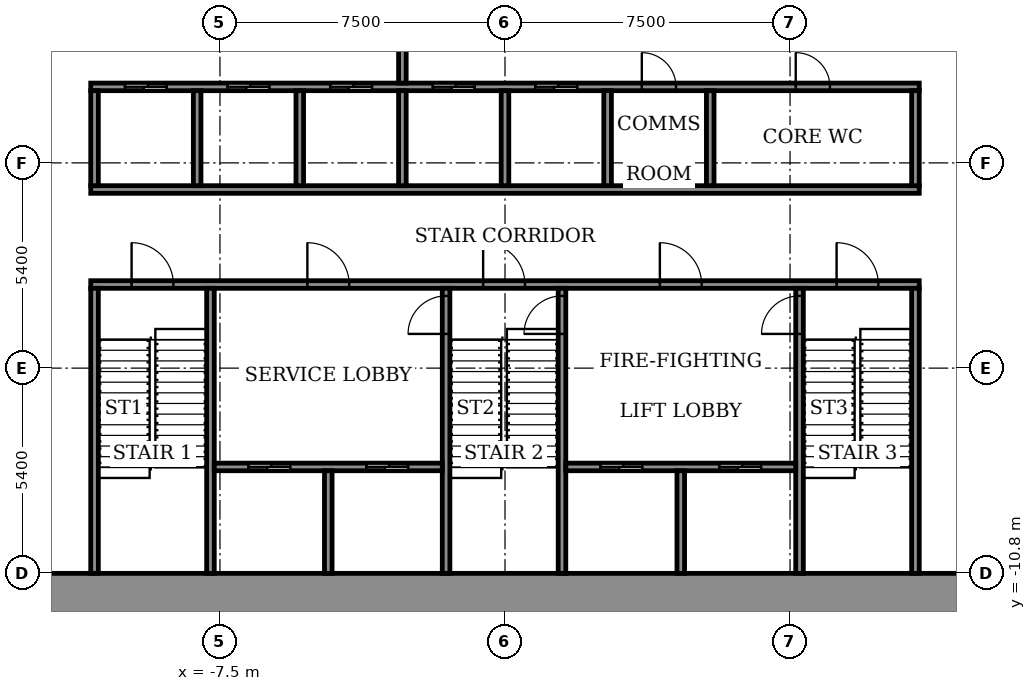
"""IFC4 building model, lengths in metres.
Left out: names, types, materials, properties, quantities, classifications, styles, units other than length and angle.
Written with IfcOpenShell. Run it as: python <this file> out.ifc"""

import sys

from ifc_helpers import new_model, si_unit, direction, frame, frame_2d, origin, place, context, subcontext, project, spatial, rectangle, extrude, element, fill, save


model = new_model("IFC4")
c1 = context("Model", 3, precision=1e-05, world=origin(), true_north=direction((0.0, 1.0)))
c2 = subcontext(c1, "Body", "Model", "MODEL_VIEW")
j1 = project(units=[si_unit("LENGTHUNIT", "METRE"), si_unit("PLANEANGLEUNIT", "RADIAN")], contexts=[c1])
p1 = place(None, origin())
s1 = spatial("IfcSite", under=j1, at=p1, CompositionType="ELEMENT")
p2 = place(p1, origin())
s2 = spatial("IfcBuilding", under=s1, at=p2, CompositionType="ELEMENT")
p3 = place(p2, frame((0.0, 0.0, 52.1)))
s3 = spatial("IfcBuildingStorey", under=s2, at=p3, CompositionType="ELEMENT", Elevation=52.1)
p4 = place(p3, frame((-14.9, -11.35, 0.0), z_axis=(0.0, 0.0, 1.0), x_axis=(1.0, 0.0, 0.0)))
e1 = element("IfcWall", 1, at=p4, inside=s3, PredefinedType="SHEAR", context=c2, shape_type="SweptSolid", body=[
    extrude(rectangle(XDim=29.8, YDim=1.1, at=frame_2d((14.9, 0.0))), origin(), (0.0, 0.0, 1.0), 4.6),
])
p5 = place(p3, frame((-10.9, -3.2, 0.0), z_axis=(0.0, 0.0, 1.0), x_axis=(1.0, 0.0, 0.0)))
e2 = element("IfcWall", 2, at=p5, inside=s3, PredefinedType="SHEAR", context=c2, shape_type="SweptSolid", body=[
    extrude(rectangle(XDim=21.8, YDim=0.2, at=frame_2d((10.9, 0.0))), origin(), (0.0, 0.0, 1.0), 4.05),
])
p6 = place(p5, frame((1.075, 0.0, 0.0)))
e3 = element("IfcOpeningElement", 3, at=p6, cuts=e2, PredefinedType="OPENING", context=c2, shape_type="SweptSolid", body=[
    extrude(rectangle(XDim=1.1, YDim=2.1, at=frame_2d((0.55, 1.05))), frame((0.0, 0.11, 0.0), z_axis=(0.0, -1.0, 0.0), x_axis=(1.0, 0.0, 0.0)), (0.0, 0.0, 1.0), 0.22),
])
p7 = place(p5, frame((10.325, 0.0, 0.0)))
e4 = element("IfcOpeningElement", 4, at=p7, cuts=e2, PredefinedType="OPENING", context=c2, shape_type="SweptSolid", body=[
    extrude(rectangle(XDim=1.1, YDim=2.1, at=frame_2d((0.55, 1.05))), frame((0.0, 0.11, 0.0), z_axis=(0.0, -1.0, 0.0), x_axis=(1.0, 0.0, 0.0)), (0.0, 0.0, 1.0), 0.22),
])
p8 = place(p5, frame((19.625, 0.0, 0.0)))
e5 = element("IfcOpeningElement", 5, at=p8, cuts=e2, PredefinedType="OPENING", context=c2, shape_type="SweptSolid", body=[
    extrude(rectangle(XDim=1.1, YDim=2.1, at=frame_2d((0.55, 1.05))), frame((0.0, 0.11, 0.0), z_axis=(0.0, -1.0, 0.0), x_axis=(1.0, 0.0, 0.0)), (0.0, 0.0, 1.0), 0.22),
])
p9 = place(p5, frame((5.7, 0.0, 0.0)))
e6 = element("IfcOpeningElement", 6, at=p9, cuts=e2, PredefinedType="OPENING", context=c2, shape_type="SweptSolid", body=[
    extrude(rectangle(XDim=1.1, YDim=2.1, at=frame_2d((0.55, 1.05))), frame((0.0, 0.11, 0.0), z_axis=(0.0, -1.0, 0.0), x_axis=(1.0, 0.0, 0.0)), (0.0, 0.0, 1.0), 0.22),
])
p10 = place(p5, frame((14.975, 0.0, 0.0)))
e7 = element("IfcOpeningElement", 7, at=p10, cuts=e2, PredefinedType="OPENING", context=c2, shape_type="SweptSolid", body=[
    extrude(rectangle(XDim=1.1, YDim=2.1, at=frame_2d((0.55, 1.05))), frame((0.0, 0.11, 0.0), z_axis=(0.0, -1.0, 0.0), x_axis=(1.0, 0.0, 0.0)), (0.0, 0.0, 1.0), 0.22),
])
p11 = place(p3, frame((-10.9, -0.7, 0.0), z_axis=(0.0, 0.0, 1.0), x_axis=(1.0, 0.0, 0.0)))
e8 = element("IfcWall", 8, at=p11, inside=s3, PredefinedType="SHEAR", context=c2, shape_type="SweptSolid", body=[
    extrude(rectangle(XDim=21.8, YDim=0.2, at=frame_2d((10.9, 0.0))), origin(), (0.0, 0.0, 1.0), 4.05),
])
p12 = place(p3, frame((-10.9, 2.0, 0.0), z_axis=(0.0, 0.0, 1.0), x_axis=(1.0, 0.0, 0.0)))
e9 = element("IfcWall", 9, at=p12, inside=s3, PredefinedType="SHEAR", context=c2, shape_type="SweptSolid", body=[
    extrude(rectangle(XDim=21.8, YDim=0.2, at=frame_2d((10.9, 0.0))), origin(), (0.0, 0.0, 1.0), 4.05),
])
p13 = place(p12, frame((0.9, 0.0, 0.0)))
e10 = element("IfcOpeningElement", 10, at=p13, cuts=e9, PredefinedType="OPENING", context=c2, shape_type="SweptSolid", body=[
    extrude(rectangle(XDim=1.1, YDim=2.1, at=frame_2d((0.55, 1.05))), frame((0.0, 0.11, 0.0), z_axis=(0.0, -1.0, 0.0), x_axis=(1.0, 0.0, 0.0)), (0.0, 0.0, 1.0), 0.22),
])
p14 = place(p12, frame((3.6, 0.0, 0.0)))
e11 = element("IfcOpeningElement", 11, at=p14, cuts=e9, PredefinedType="OPENING", context=c2, shape_type="SweptSolid", body=[
    extrude(rectangle(XDim=1.1, YDim=2.1, at=frame_2d((0.55, 1.05))), frame((0.0, 0.11, 0.0), z_axis=(0.0, -1.0, 0.0), x_axis=(1.0, 0.0, 0.0)), (0.0, 0.0, 1.0), 0.22),
])
p15 = place(p12, frame((6.3, 0.0, 0.0)))
e12 = element("IfcOpeningElement", 12, at=p15, cuts=e9, PredefinedType="OPENING", context=c2, shape_type="SweptSolid", body=[
    extrude(rectangle(XDim=1.1, YDim=2.1, at=frame_2d((0.55, 1.05))), frame((0.0, 0.11, 0.0), z_axis=(0.0, -1.0, 0.0), x_axis=(1.0, 0.0, 0.0)), (0.0, 0.0, 1.0), 0.22),
])
p16 = place(p12, frame((9.0, 0.0, 0.0)))
e13 = element("IfcOpeningElement", 13, at=p16, cuts=e9, PredefinedType="OPENING", context=c2, shape_type="SweptSolid", body=[
    extrude(rectangle(XDim=1.1, YDim=2.1, at=frame_2d((0.55, 1.05))), frame((0.0, 0.11, 0.0), z_axis=(0.0, -1.0, 0.0), x_axis=(1.0, 0.0, 0.0)), (0.0, 0.0, 1.0), 0.22),
])
p17 = place(p12, frame((11.7, 0.0, 0.0)))
e14 = element("IfcOpeningElement", 14, at=p17, cuts=e9, PredefinedType="OPENING", context=c2, shape_type="SweptSolid", body=[
    extrude(rectangle(XDim=1.1, YDim=2.1, at=frame_2d((0.55, 1.05))), frame((0.0, 0.11, 0.0), z_axis=(0.0, -1.0, 0.0), x_axis=(1.0, 0.0, 0.0)), (0.0, 0.0, 1.0), 0.22),
])
p18 = place(p12, frame((14.5, 0.0, 0.0)))
e15 = element("IfcOpeningElement", 15, at=p18, cuts=e9, PredefinedType="OPENING", context=c2, shape_type="SweptSolid", body=[
    extrude(rectangle(XDim=0.9, YDim=2.1, at=frame_2d((0.45, 1.05))), frame((0.0, 0.11, 0.0), z_axis=(0.0, -1.0, 0.0), x_axis=(1.0, 0.0, 0.0)), (0.0, 0.0, 1.0), 0.22),
])
p19 = place(p12, frame((18.55, 0.0, 0.0)))
e16 = element("IfcOpeningElement", 16, at=p19, cuts=e9, PredefinedType="OPENING", context=c2, shape_type="SweptSolid", body=[
    extrude(rectangle(XDim=0.9, YDim=2.1, at=frame_2d((0.45, 1.05))), frame((0.0, 0.11, 0.0), z_axis=(0.0, -1.0, 0.0), x_axis=(1.0, 0.0, 0.0)), (0.0, 0.0, 1.0), 0.22),
])
for number, where, z_axis, x_axis in (
    (17, (-10.8, -10.8, 0.0), (0.0, 0.0, 1.0), (0.0, 1.0, 0.0)),
    (18, (-7.75, -10.8, 0.0), (0.0, 0.0, 1.0), (0.0, 1.0, 0.0)),
):
    element("IfcWall", number, at=place(p3, frame(where, z_axis=z_axis, x_axis=x_axis)), inside=s3, PredefinedType="SHEAR", context=c2, shape_type="SweptSolid", body=[
        extrude(rectangle(XDim=7.5, YDim=0.2, at=frame_2d((3.75, 0.0))), origin(), (0.0, 0.0, 1.0), 4.05),
    ])
p20 = place(p3, frame((-1.55, -10.8, 0.0), z_axis=(0.0, 0.0, 1.0), x_axis=(0.0, 1.0, 0.0)))
e19 = element("IfcWall", 19, at=p20, inside=s3, PredefinedType="SHEAR", context=c2, shape_type="SweptSolid", body=[
    extrude(rectangle(XDim=7.5, YDim=0.2, at=frame_2d((3.75, 0.0))), origin(), (0.0, 0.0, 1.0), 4.05),
])
p21 = place(p20, frame((6.3, 0.0, 0.0)))
e20 = element("IfcOpeningElement", 20, at=p21, cuts=e19, PredefinedType="OPENING", context=c2, shape_type="SweptSolid", body=[
    extrude(rectangle(XDim=1.0, YDim=2.1, at=frame_2d((0.5, 1.05))), frame((0.0, 0.11, 0.0), z_axis=(0.0, -1.0, 0.0), x_axis=(1.0, 0.0, 0.0)), (0.0, 0.0, 1.0), 0.22),
])
p22 = place(p3, frame((1.5, -10.8, 0.0), z_axis=(0.0, 0.0, 1.0), x_axis=(0.0, 1.0, 0.0)))
e21 = element("IfcWall", 21, at=p22, inside=s3, PredefinedType="SHEAR", context=c2, shape_type="SweptSolid", body=[
    extrude(rectangle(XDim=7.5, YDim=0.2, at=frame_2d((3.75, 0.0))), origin(), (0.0, 0.0, 1.0), 4.05),
])
p23 = place(p22, frame((6.3, 0.0, 0.0)))
e22 = element("IfcOpeningElement", 22, at=p23, cuts=e21, PredefinedType="OPENING", context=c2, shape_type="SweptSolid", body=[
    extrude(rectangle(XDim=1.0, YDim=2.1, at=frame_2d((0.5, 1.05))), frame((0.0, 0.11, 0.0), z_axis=(0.0, -1.0, 0.0), x_axis=(1.0, 0.0, 0.0)), (0.0, 0.0, 1.0), 0.22),
])
p24 = place(p3, frame((7.75, -10.8, 0.0), z_axis=(0.0, 0.0, 1.0), x_axis=(0.0, 1.0, 0.0)))
e23 = element("IfcWall", 23, at=p24, inside=s3, PredefinedType="SHEAR", context=c2, shape_type="SweptSolid", body=[
    extrude(rectangle(XDim=7.5, YDim=0.2, at=frame_2d((3.75, 0.0))), origin(), (0.0, 0.0, 1.0), 4.05),
])
p25 = place(p24, frame((6.3, 0.0, 0.0)))
e24 = element("IfcOpeningElement", 24, at=p25, cuts=e23, PredefinedType="OPENING", context=c2, shape_type="SweptSolid", body=[
    extrude(rectangle(XDim=1.0, YDim=2.1, at=frame_2d((0.5, 1.05))), frame((0.0, 0.11, 0.0), z_axis=(0.0, -1.0, 0.0), x_axis=(1.0, 0.0, 0.0)), (0.0, 0.0, 1.0), 0.22),
])
p26 = place(p3, frame((10.8, -10.8, 0.0), z_axis=(0.0, 0.0, 1.0), x_axis=(0.0, 1.0, 0.0)))
e25 = element("IfcWall", 25, at=p26, inside=s3, PredefinedType="SHEAR", context=c2, shape_type="SweptSolid", body=[
    extrude(rectangle(XDim=7.5, YDim=0.2, at=frame_2d((3.75, 0.0))), origin(), (0.0, 0.0, 1.0), 4.05),
])
p27 = place(p3, frame((-7.65, -8.0, 0.0), z_axis=(0.0, 0.0, 1.0), x_axis=(1.0, 0.0, 0.0)))
e26 = element("IfcWall", 26, at=p27, inside=s3, PredefinedType="SHEAR", context=c2, shape_type="SweptSolid", body=[
    extrude(rectangle(XDim=6.0, YDim=0.2, at=frame_2d((3.0, 0.0))), origin(), (0.0, 0.0, 1.0), 4.05),
])
p28 = place(p27, frame((0.9, 0.0, 0.0)))
e27 = element("IfcOpeningElement", 27, at=p28, cuts=e26, PredefinedType="OPENING", context=c2, shape_type="SweptSolid", body=[
    extrude(rectangle(XDim=1.1, YDim=2.1, at=frame_2d((0.55, 1.05))), frame((0.0, 0.11, 0.0), z_axis=(0.0, -1.0, 0.0), x_axis=(1.0, 0.0, 0.0)), (0.0, 0.0, 1.0), 0.22),
])
p29 = place(p27, frame((4.0, 0.0, 0.0)))
e28 = element("IfcOpeningElement", 28, at=p29, cuts=e26, PredefinedType="OPENING", context=c2, shape_type="SweptSolid", body=[
    extrude(rectangle(XDim=1.1, YDim=2.1, at=frame_2d((0.55, 1.05))), frame((0.0, 0.11, 0.0), z_axis=(0.0, -1.0, 0.0), x_axis=(1.0, 0.0, 0.0)), (0.0, 0.0, 1.0), 0.22),
])
p30 = place(p3, frame((-4.65, -10.8, 0.0), z_axis=(0.0, 0.0, 1.0), x_axis=(0.0, 1.0, 0.0)))
e29 = element("IfcWall", 29, at=p30, inside=s3, PredefinedType="SHEAR", context=c2, shape_type="SweptSolid", body=[
    extrude(rectangle(XDim=2.7, YDim=0.2, at=frame_2d((1.35, 0.0))), origin(), (0.0, 0.0, 1.0), 4.05),
])
p31 = place(p3, frame((1.6, -8.0, 0.0), z_axis=(0.0, 0.0, 1.0), x_axis=(1.0, 0.0, 0.0)))
e30 = element("IfcWall", 30, at=p31, inside=s3, PredefinedType="SHEAR", context=c2, shape_type="SweptSolid", body=[
    extrude(rectangle(XDim=6.05, YDim=0.2, at=frame_2d((3.025, 0.0))), origin(), (0.0, 0.0, 1.0), 4.05),
])
p32 = place(p31, frame((0.913, 0.0, 0.0)))
e31 = element("IfcOpeningElement", 31, at=p32, cuts=e30, PredefinedType="OPENING", context=c2, shape_type="SweptSolid", body=[
    extrude(rectangle(XDim=1.1, YDim=2.1, at=frame_2d((0.55, 1.05))), frame((0.0, 0.11, 0.0), z_axis=(0.0, -1.0, 0.0), x_axis=(1.0, 0.0, 0.0)), (0.0, 0.0, 1.0), 0.22),
])
p33 = place(p31, frame((4.038, 0.0, 0.0)))
e32 = element("IfcOpeningElement", 32, at=p33, cuts=e30, PredefinedType="OPENING", context=c2, shape_type="SweptSolid", body=[
    extrude(rectangle(XDim=1.1, YDim=2.1, at=frame_2d((0.55, 1.05))), frame((0.0, 0.11, 0.0), z_axis=(0.0, -1.0, 0.0), x_axis=(1.0, 0.0, 0.0)), (0.0, 0.0, 1.0), 0.22),
])
p34 = place(p3, frame((4.625, -10.8, 0.0), z_axis=(0.0, 0.0, 1.0), x_axis=(0.0, 1.0, 0.0)))
e33 = element("IfcWall", 33, at=p34, inside=s3, PredefinedType="SHEAR", context=c2, shape_type="SweptSolid", body=[
    extrude(rectangle(XDim=2.7, YDim=0.2, at=frame_2d((1.35, 0.0))), origin(), (0.0, 0.0, 1.0), 4.05),
])
for number, where, z_axis, x_axis in (
    (34, (-10.8, -0.6, 0.0), (0.0, 0.0, 1.0), (0.0, 1.0, 0.0)),
    (35, (-8.1, -0.6, 0.0), (0.0, 0.0, 1.0), (0.0, 1.0, 0.0)),
    (36, (-5.4, -0.6, 0.0), (0.0, 0.0, 1.0), (0.0, 1.0, 0.0)),
    (37, (-2.7, -0.6, 0.0), (0.0, 0.0, 1.0), (0.0, 1.0, 0.0)),
    (38, (0.0, -0.6, 0.0), (0.0, 0.0, 1.0), (0.0, 1.0, 0.0)),
    (39, (2.7, -0.6, 0.0), (0.0, 0.0, 1.0), (0.0, 1.0, 0.0)),
):
    element("IfcWall", number, at=place(p3, frame(where, z_axis=z_axis, x_axis=x_axis)), inside=s3, PredefinedType="SHEAR", context=c2, shape_type="SweptSolid", body=[
        extrude(rectangle(XDim=2.5, YDim=0.2, at=frame_2d((1.25, 0.0))), origin(), (0.0, 0.0, 1.0), 4.05),
    ])
for number, where, z_axis, x_axis in (
    (40, (5.4, -0.6, 0.0), (0.0, 0.0, 1.0), (0.0, 1.0, 0.0)),
    (41, (10.8, -0.6, 0.0), (0.0, 0.0, 1.0), (0.0, 1.0, 0.0)),
):
    element("IfcWall", number, at=place(p3, frame(where, z_axis=z_axis, x_axis=x_axis)), inside=s3, PredefinedType="STANDARD", context=c2, shape_type="SweptSolid", body=[
        extrude(rectangle(XDim=2.5, YDim=0.2, at=frame_2d((1.25, 0.0))), origin(), (0.0, 0.0, 1.0), 4.05),
    ])
p35 = place(p3, frame((-2.7, 2.1, 0.0), z_axis=(0.0, 0.0, 1.0), x_axis=(0.0, 1.0, 0.0)))
e42 = element("IfcWall", 42, at=p35, inside=s3, PredefinedType="STANDARD", context=c2, shape_type="SweptSolid", body=[
    extrude(rectangle(XDim=5.9, YDim=0.2, at=frame_2d((2.95, 0.0))), origin(), (0.0, 0.0, 1.0), 4.05),
])
p36 = place(p35, frame((2.35, 0.0, 0.0)))
e43 = element("IfcOpeningElement", 43, at=p36, cuts=e42, PredefinedType="OPENING", context=c2, shape_type="SweptSolid", body=[
    extrude(rectangle(XDim=1.2, YDim=2.1, at=frame_2d((0.6, 1.05))), frame((0.0, 0.11, 0.0), z_axis=(0.0, -1.0, 0.0), x_axis=(1.0, 0.0, 0.0)), (0.0, 0.0, 1.0), 0.22),
])
p37 = place(p13, origin())
e44 = element("IfcDoor", 44, at=p37, inside=s3, OperationType="SLIDING_TO_LEFT", PredefinedType="DOOR", context=c2, shape_type="SweptSolid", body=[
    extrude(rectangle(XDim=1.1, YDim=2.1, at=frame_2d((0.55, 1.05))), frame((0.0, 0.025, 0.0), z_axis=(0.0, -1.0, 0.0), x_axis=(1.0, 0.0, 0.0)), (0.0, 0.0, 1.0), 0.05),
])
fill(e10, e44)
p38 = place(p14, origin())
e45 = element("IfcDoor", 45, at=p38, inside=s3, OperationType="SLIDING_TO_LEFT", PredefinedType="DOOR", context=c2, shape_type="SweptSolid", body=[
    extrude(rectangle(XDim=1.1, YDim=2.1, at=frame_2d((0.55, 1.05))), frame((0.0, 0.025, 0.0), z_axis=(0.0, -1.0, 0.0), x_axis=(1.0, 0.0, 0.0)), (0.0, 0.0, 1.0), 0.05),
])
fill(e11, e45)
p39 = place(p15, origin())
e46 = element("IfcDoor", 46, at=p39, inside=s3, OperationType="SLIDING_TO_LEFT", PredefinedType="DOOR", context=c2, shape_type="SweptSolid", body=[
    extrude(rectangle(XDim=1.1, YDim=2.1, at=frame_2d((0.55, 1.05))), frame((0.0, 0.025, 0.0), z_axis=(0.0, -1.0, 0.0), x_axis=(1.0, 0.0, 0.0)), (0.0, 0.0, 1.0), 0.05),
])
fill(e12, e46)
p40 = place(p16, origin())
e47 = element("IfcDoor", 47, at=p40, inside=s3, OperationType="SLIDING_TO_LEFT", PredefinedType="DOOR", context=c2, shape_type="SweptSolid", body=[
    extrude(rectangle(XDim=1.1, YDim=2.1, at=frame_2d((0.55, 1.05))), frame((0.0, 0.025, 0.0), z_axis=(0.0, -1.0, 0.0), x_axis=(1.0, 0.0, 0.0)), (0.0, 0.0, 1.0), 0.05),
])
fill(e13, e47)
p41 = place(p17, origin())
e48 = element("IfcDoor", 48, at=p41, inside=s3, OperationType="SLIDING_TO_LEFT", PredefinedType="DOOR", context=c2, shape_type="SweptSolid", body=[
    extrude(rectangle(XDim=1.1, YDim=2.1, at=frame_2d((0.55, 1.05))), frame((0.0, 0.025, 0.0), z_axis=(0.0, -1.0, 0.0), x_axis=(1.0, 0.0, 0.0)), (0.0, 0.0, 1.0), 0.05),
])
fill(e14, e48)
p42 = place(p18, origin())
e49 = element("IfcDoor", 49, at=p42, inside=s3, OperationType="SINGLE_SWING_LEFT", PredefinedType="DOOR", context=c2, shape_type="SweptSolid", body=[
    extrude(rectangle(XDim=0.9, YDim=2.1, at=frame_2d((0.45, 1.05))), frame((0.0, 0.025, 0.0), z_axis=(0.0, -1.0, 0.0), x_axis=(1.0, 0.0, 0.0)), (0.0, 0.0, 1.0), 0.05),
])
fill(e15, e49)
p43 = place(p19, origin())
e50 = element("IfcDoor", 50, at=p43, inside=s3, OperationType="SINGLE_SWING_RIGHT", PredefinedType="DOOR", context=c2, shape_type="SweptSolid", body=[
    extrude(rectangle(XDim=0.9, YDim=2.1, at=frame_2d((0.45, 1.05))), frame((0.0, 0.025, 0.0), z_axis=(0.0, -1.0, 0.0), x_axis=(1.0, 0.0, 0.0)), (0.0, 0.0, 1.0), 0.05),
])
fill(e16, e50)
p44 = place(p32, origin())
e51 = element("IfcDoor", 51, at=p44, inside=s3, OperationType="SLIDING_TO_LEFT", PredefinedType="DOOR", context=c2, shape_type="SweptSolid", body=[
    extrude(rectangle(XDim=1.1, YDim=2.1, at=frame_2d((0.55, 1.05))), frame((0.0, 0.025, 0.0), z_axis=(0.0, -1.0, 0.0), x_axis=(1.0, 0.0, 0.0)), (0.0, 0.0, 1.0), 0.05),
])
fill(e31, e51)
p45 = place(p28, origin())
e52 = element("IfcDoor", 52, at=p45, inside=s3, OperationType="SLIDING_TO_LEFT", PredefinedType="DOOR", context=c2, shape_type="SweptSolid", body=[
    extrude(rectangle(XDim=1.1, YDim=2.1, at=frame_2d((0.55, 1.05))), frame((0.0, 0.025, 0.0), z_axis=(0.0, -1.0, 0.0), x_axis=(1.0, 0.0, 0.0)), (0.0, 0.0, 1.0), 0.05),
])
fill(e27, e52)
p46 = place(p33, origin())
e53 = element("IfcDoor", 53, at=p46, inside=s3, OperationType="SLIDING_TO_LEFT", PredefinedType="DOOR", context=c2, shape_type="SweptSolid", body=[
    extrude(rectangle(XDim=1.1, YDim=2.1, at=frame_2d((0.55, 1.05))), frame((0.0, 0.025, 0.0), z_axis=(0.0, -1.0, 0.0), x_axis=(1.0, 0.0, 0.0)), (0.0, 0.0, 1.0), 0.05),
])
fill(e32, e53)
p47 = place(p29, origin())
e54 = element("IfcDoor", 54, at=p47, inside=s3, OperationType="SLIDING_TO_LEFT", PredefinedType="DOOR", context=c2, shape_type="SweptSolid", body=[
    extrude(rectangle(XDim=1.1, YDim=2.1, at=frame_2d((0.55, 1.05))), frame((0.0, 0.025, 0.0), z_axis=(0.0, -1.0, 0.0), x_axis=(1.0, 0.0, 0.0)), (0.0, 0.0, 1.0), 0.05),
])
fill(e28, e54)
p48 = place(p6, origin())
e55 = element("IfcDoor", 55, at=p48, inside=s3, OperationType="SINGLE_SWING_RIGHT", PredefinedType="DOOR", context=c2, shape_type="SweptSolid", body=[
    extrude(rectangle(XDim=1.1, YDim=2.1, at=frame_2d((0.55, 1.05))), frame((0.0, 0.025, 0.0), z_axis=(0.0, -1.0, 0.0), x_axis=(1.0, 0.0, 0.0)), (0.0, 0.0, 1.0), 0.05),
])
fill(e3, e55)
p49 = place(p7, origin())
e56 = element("IfcDoor", 56, at=p49, inside=s3, OperationType="SINGLE_SWING_RIGHT", PredefinedType="DOOR", context=c2, shape_type="SweptSolid", body=[
    extrude(rectangle(XDim=1.1, YDim=2.1, at=frame_2d((0.55, 1.05))), frame((0.0, 0.025, 0.0), z_axis=(0.0, -1.0, 0.0), x_axis=(1.0, 0.0, 0.0)), (0.0, 0.0, 1.0), 0.05),
])
fill(e4, e56)
p50 = place(p8, origin())
e57 = element("IfcDoor", 57, at=p50, inside=s3, OperationType="SINGLE_SWING_RIGHT", PredefinedType="DOOR", context=c2, shape_type="SweptSolid", body=[
    extrude(rectangle(XDim=1.1, YDim=2.1, at=frame_2d((0.55, 1.05))), frame((0.0, 0.025, 0.0), z_axis=(0.0, -1.0, 0.0), x_axis=(1.0, 0.0, 0.0)), (0.0, 0.0, 1.0), 0.05),
])
fill(e5, e57)
p51 = place(p9, origin())
e58 = element("IfcDoor", 58, at=p51, inside=s3, OperationType="SINGLE_SWING_LEFT", PredefinedType="DOOR", context=c2, shape_type="SweptSolid", body=[
    extrude(rectangle(XDim=1.1, YDim=2.1, at=frame_2d((0.55, 1.05))), frame((0.0, 0.025, 0.0), z_axis=(0.0, -1.0, 0.0), x_axis=(1.0, 0.0, 0.0)), (0.0, 0.0, 1.0), 0.05),
])
fill(e6, e58)
p52 = place(p10, origin())
e59 = element("IfcDoor", 59, at=p52, inside=s3, OperationType="SINGLE_SWING_LEFT", PredefinedType="DOOR", context=c2, shape_type="SweptSolid", body=[
    extrude(rectangle(XDim=1.1, YDim=2.1, at=frame_2d((0.55, 1.05))), frame((0.0, 0.025, 0.0), z_axis=(0.0, -1.0, 0.0), x_axis=(1.0, 0.0, 0.0)), (0.0, 0.0, 1.0), 0.05),
])
fill(e7, e59)
p53 = place(p21, origin())
e60 = element("IfcDoor", 60, at=p53, inside=s3, OperationType="SINGLE_SWING_RIGHT", PredefinedType="DOOR", context=c2, shape_type="SweptSolid", body=[
    extrude(rectangle(XDim=1.0, YDim=2.1, at=frame_2d((0.5, 1.05))), frame((0.0, 0.025, 0.0), z_axis=(0.0, -1.0, 0.0), x_axis=(1.0, 0.0, 0.0)), (0.0, 0.0, 1.0), 0.05),
])
fill(e20, e60)
p54 = place(p23, origin())
e61 = element("IfcDoor", 61, at=p54, inside=s3, OperationType="SINGLE_SWING_RIGHT", PredefinedType="DOOR", context=c2, shape_type="SweptSolid", body=[
    extrude(rectangle(XDim=1.0, YDim=2.1, at=frame_2d((0.5, 1.05))), frame((0.0, 0.025, 0.0), z_axis=(0.0, -1.0, 0.0), x_axis=(1.0, 0.0, 0.0)), (0.0, 0.0, 1.0), 0.05),
])
fill(e22, e61)
p55 = place(p25, origin())
e62 = element("IfcDoor", 62, at=p55, inside=s3, OperationType="SINGLE_SWING_RIGHT", PredefinedType="DOOR", context=c2, shape_type="SweptSolid", body=[
    extrude(rectangle(XDim=1.0, YDim=2.1, at=frame_2d((0.5, 1.05))), frame((0.0, 0.025, 0.0), z_axis=(0.0, -1.0, 0.0), x_axis=(1.0, 0.0, 0.0)), (0.0, 0.0, 1.0), 0.05),
])
fill(e24, e62)
save(model, sys.argv[1])
